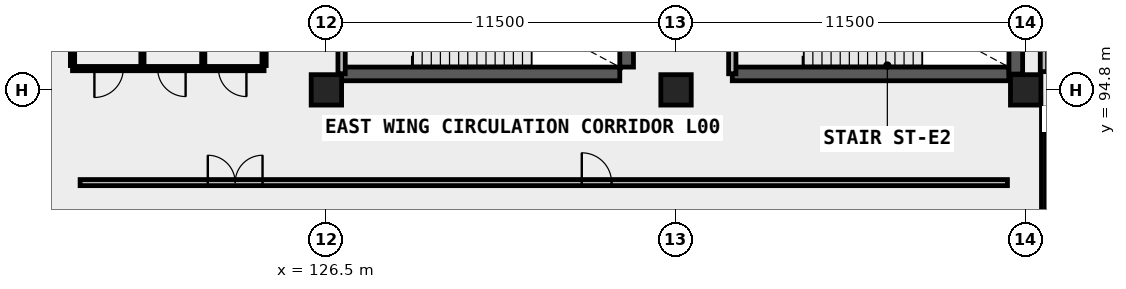
"""IFC4 building model, lengths in metres.
Left out: names, types, materials, properties, quantities, classifications, styles, units other than length and angle.
Written with IfcOpenShell. Run it as: python <this file> out.ifc"""

import sys

from ifc_helpers import new_model, si_unit, direction, frame, frame_2d, origin, origin_2d, place, context, subcontext, project, spatial, rectangle, extrude, element, fill, save


model = new_model("IFC4")
c1 = context("Model", 3, precision=1e-05, world=origin(), true_north=direction((0.0, 1.0)))
c2 = subcontext(c1, "Body", "Model", "MODEL_VIEW")
j1 = project(units=[si_unit("LENGTHUNIT", "METRE"), si_unit("PLANEANGLEUNIT", "RADIAN")], contexts=[c1])
p1 = place(None, origin())
s1 = spatial("IfcSite", under=j1, at=p1, CompositionType="ELEMENT")
p2 = place(p1, origin())
s2 = spatial("IfcBuilding", under=s1, at=p2, CompositionType="ELEMENT")
p3 = place(p2, origin())
s3 = spatial("IfcBuildingStorey", under=s2, at=p3, CompositionType="ELEMENT", Elevation=0.0)
for number, where, z_axis, x_axis in (
    (1, (126.5, 94.8, 0.0), (0.0, 0.0, 1.0), (1.0, 0.0, 0.0)),
    (2, (138.0, 94.8, 0.0), (0.0, 0.0, 1.0), (1.0, 0.0, 0.0)),
    (3, (149.5, 94.8, 0.0), (0.0, 0.0, 1.0), (1.0, 0.0, 0.0)),
):
    element("IfcColumn", number, at=place(p3, frame(where, z_axis=z_axis, x_axis=x_axis)), inside=s3, PredefinedType="COLUMN", context=c2, shape_type="SweptSolid", body=[
        extrude(rectangle(XDim=1.0, YDim=1.0, at=origin_2d()), origin(), (0.0, 0.0, 1.0), 4.2),
    ])
p4 = place(p3, frame((127.0, 95.325, 0.0), z_axis=(0.0, 0.0, 1.0), x_axis=(1.0, 0.0, 0.0)))
e4 = element("IfcWall", 4, at=p4, inside=s3, PredefinedType="SHEAR", context=c2, shape_type="SweptSolid", body=[
    extrude(rectangle(XDim=9.15, YDim=0.45, at=frame_2d((4.575, 0.0))), origin(), (0.0, 0.0, 1.0), 4.2),
])
p5 = place(p3, frame((136.375, 95.55, 0.0), z_axis=(0.0, 0.0, 1.0), x_axis=(0.0, 1.0, 0.0)))
e5 = element("IfcWall", 5, at=p5, inside=s3, PredefinedType="SHEAR", context=c2, shape_type="SweptSolid", body=[
    extrude(rectangle(XDim=3.6, YDim=0.45, at=frame_2d((1.8, 0.0))), origin(), (0.0, 0.0, 1.0), 4.2),
])
p6 = place(p3, frame((139.85, 95.325, 0.0), z_axis=(0.0, 0.0, 1.0), x_axis=(1.0, 0.0, 0.0)))
e6 = element("IfcWall", 6, at=p6, inside=s3, PredefinedType="SHEAR", context=c2, shape_type="SweptSolid", body=[
    extrude(rectangle(XDim=9.1, YDim=0.45, at=frame_2d((4.55, 0.0))), origin(), (0.0, 0.0, 1.0), 4.2),
])
p7 = place(p3, frame((149.175, 95.32, 0.0), z_axis=(0.0, 0.0, 1.0), x_axis=(0.0, 1.0, 0.0)))
e7 = element("IfcWall", 7, at=p7, inside=s3, PredefinedType="SHEAR", context=c2, shape_type="SweptSolid", body=[
    extrude(rectangle(XDim=3.83, YDim=0.45, at=frame_2d((1.915, 0.0))), origin(), (0.0, 0.0, 1.0), 4.2),
])
p8 = place(p3, frame((127.0, 95.33, 0.0), z_axis=(0.0, 0.0, 1.0), x_axis=(0.0, 1.0, 0.0)))
e8 = element("IfcWall", 8, at=p8, inside=s3, PredefinedType="SOLIDWALL", context=c2, shape_type="SweptSolid", body=[
    extrude(rectangle(XDim=4.04, YDim=0.24, at=frame_2d((2.02, 0.0))), origin(), (0.0, 0.0, 1.0), 3.88),
])
p9 = place(p8, frame((1.45, 0.0, 0.0)))
e9 = element("IfcOpeningElement", 9, at=p9, cuts=e8, PredefinedType="OPENING", context=c2, shape_type="SweptSolid", body=[
    extrude(rectangle(XDim=1.13, YDim=2.15, at=frame_2d((0.565, 1.075))), frame((0.0, 0.13, 0.0), z_axis=(0.0, -1.0, 0.0), x_axis=(1.0, 0.0, 0.0)), (0.0, 0.0, 1.0), 0.26),
])
p10 = place(p3, frame((139.85, 95.33, 0.0), z_axis=(0.0, 0.0, 1.0), x_axis=(0.0, 1.0, 0.0)))
e10 = element("IfcWall", 10, at=p10, inside=s3, PredefinedType="SOLIDWALL", context=c2, shape_type="SweptSolid", body=[
    extrude(rectangle(XDim=4.04, YDim=0.24, at=frame_2d((2.02, 0.0))), origin(), (0.0, 0.0, 1.0), 3.88),
])
p11 = place(p10, frame((1.45, 0.0, 0.0)))
e11 = element("IfcOpeningElement", 11, at=p11, cuts=e10, PredefinedType="OPENING", context=c2, shape_type="SweptSolid", body=[
    extrude(rectangle(XDim=1.13, YDim=2.15, at=frame_2d((0.565, 1.075))), frame((0.0, 0.13, 0.0), z_axis=(0.0, -1.0, 0.0), x_axis=(1.0, 0.0, 0.0)), (0.0, 0.0, 1.0), 0.26),
])
p12 = place(p3, frame((118.15, 95.5, 0.0), z_axis=(0.0, 0.0, 1.0), x_axis=(1.0, 0.0, 0.0)))
e12 = element("IfcWall", 12, at=p12, inside=s3, PredefinedType="PLUMBINGWALL", context=c2, shape_type="SweptSolid", body=[
    extrude(rectangle(XDim=6.3, YDim=0.14, at=frame_2d((3.15, 0.0))), origin(), (0.0, 0.0, 1.0), 3.88),
])
p13 = place(p12, frame((0.72, 0.0, 0.0)))
e13 = element("IfcOpeningElement", 13, at=p13, cuts=e12, PredefinedType="OPENING", context=c2, shape_type="SweptSolid", body=[
    extrude(rectangle(XDim=0.95, YDim=2.1, at=frame_2d((0.475, 1.05))), frame((0.0, 0.08, 0.0), z_axis=(0.0, -1.0, 0.0), x_axis=(1.0, 0.0, 0.0)), (0.0, 0.0, 1.0), 0.16),
])
p14 = place(p12, frame((2.8, 0.0, 0.0)))
e14 = element("IfcOpeningElement", 14, at=p14, cuts=e12, PredefinedType="OPENING", context=c2, shape_type="SweptSolid", body=[
    extrude(rectangle(XDim=0.92, YDim=2.1, at=frame_2d((0.46, 1.05))), frame((0.0, 0.08, 0.0), z_axis=(0.0, -1.0, 0.0), x_axis=(1.0, 0.0, 0.0)), (0.0, 0.0, 1.0), 0.16),
])
p15 = place(p12, frame((4.8, 0.0, 0.0)))
e15 = element("IfcOpeningElement", 15, at=p15, cuts=e12, PredefinedType="OPENING", context=c2, shape_type="SweptSolid", body=[
    extrude(rectangle(XDim=0.92, YDim=2.1, at=frame_2d((0.46, 1.05))), frame((0.0, 0.08, 0.0), z_axis=(0.0, -1.0, 0.0), x_axis=(1.0, 0.0, 0.0)), (0.0, 0.0, 1.0), 0.16),
])
p16 = place(p3, frame((118.15, 95.6, 0.0), z_axis=(0.0, 0.0, 1.0), x_axis=(0.0, 1.0, 0.0)))
e16 = element("IfcWall", 16, at=p16, inside=s3, PredefinedType="PLUMBINGWALL", context=c2, shape_type="SweptSolid", body=[
    extrude(rectangle(XDim=2.85, YDim=0.14, at=frame_2d((1.425, 0.0))), origin(), (0.0, 0.0, 1.0), 3.88),
])
for number, where, z_axis, x_axis in (
    (17, (120.45, 95.6, 0.0), (0.0, 0.0, 1.0), (0.0, 1.0, 0.0)),
    (18, (122.45, 95.6, 0.0), (0.0, 0.0, 1.0), (0.0, 1.0, 0.0)),
):
    element("IfcWall", number, at=place(p3, frame(where, z_axis=z_axis, x_axis=x_axis)), inside=s3, PredefinedType="PARTITIONING", context=c2, shape_type="SweptSolid", body=[
        extrude(rectangle(XDim=2.85, YDim=0.105, at=frame_2d((1.425, 0.0))), origin(), (0.0, 0.0, 1.0), 3.88),
    ])
p17 = place(p3, frame((124.45, 95.6, 0.0), z_axis=(0.0, 0.0, 1.0), x_axis=(0.0, 1.0, 0.0)))
e19 = element("IfcWall", 19, at=p17, inside=s3, PredefinedType="PLUMBINGWALL", context=c2, shape_type="SweptSolid", body=[
    extrude(rectangle(XDim=2.85, YDim=0.14, at=frame_2d((1.425, 0.0))), origin(), (0.0, 0.0, 1.0), 3.88),
])
p18 = place(p3, frame((118.4, 91.75, 0.0), z_axis=(0.0, 0.0, 1.0), x_axis=(1.0, 0.0, 0.0)))
e20 = element("IfcWall", 20, at=p18, inside=s3, PredefinedType="PARTITIONING", context=c2, shape_type="SweptSolid", body=[
    extrude(rectangle(XDim=30.5, YDim=0.2, at=frame_2d((15.25, 0.0))), origin(), (0.0, 0.0, 1.0), 3.88),
])
p19 = place(p18, frame((4.2, 0.0, 0.0)))
e21 = element("IfcOpeningElement", 21, at=p19, cuts=e20, PredefinedType="OPENING", context=c2, shape_type="SweptSolid", body=[
    extrude(rectangle(XDim=1.8, YDim=2.2, at=frame_2d((0.9, 1.1))), frame((0.0, 0.11, 0.0), z_axis=(0.0, -1.0, 0.0), x_axis=(1.0, 0.0, 0.0)), (0.0, 0.0, 1.0), 0.22),
])
p20 = place(p18, frame((16.5, 0.0, 0.0)))
e22 = element("IfcOpeningElement", 22, at=p20, cuts=e20, PredefinedType="OPENING", context=c2, shape_type="SweptSolid", body=[
    extrude(rectangle(XDim=0.98, YDim=2.15, at=frame_2d((0.49, 1.075))), frame((0.0, 0.11, 0.0), z_axis=(0.0, -1.0, 0.0), x_axis=(1.0, 0.0, 0.0)), (0.0, 0.0, 1.0), 0.22),
])
p21 = place(p3, frame((150.1, 86.4, 0.0), z_axis=(0.0, 0.0, 1.0), x_axis=(0.0, 1.0, 0.0)))
e23 = element("IfcWall", 23, at=p21, inside=s3, PredefinedType="PARTITIONING", context=c2, shape_type="SweptSolid", body=[
    extrude(rectangle(XDim=7.8, YDim=0.16, at=frame_2d((3.9, 0.0))), origin(), (0.0, 0.0, 1.0), 3.88),
])
p22 = place(p21, frame((2.8, 0.0, 0.0)))
e24 = element("IfcOpeningElement", 24, at=p22, cuts=e23, PredefinedType="OPENING", context=c2, shape_type="SweptSolid", body=[
    extrude(rectangle(XDim=0.96, YDim=2.1, at=frame_2d((0.48, 1.05))), frame((0.0, 0.09, 0.0), z_axis=(0.0, -1.0, 0.0), x_axis=(1.0, 0.0, 0.0)), (0.0, 0.0, 1.0), 0.18),
])
p23 = place(p3, frame((150.1, 95.4, 0.0), z_axis=(0.0, 0.0, 1.0), x_axis=(0.0, 1.0, 0.0)))
e25 = element("IfcWall", 25, at=p23, inside=s3, PredefinedType="SOLIDWALL", context=c2, shape_type="SweptSolid", body=[
    extrude(rectangle(XDim=3.8, YDim=0.24, at=frame_2d((1.9, 0.0))), origin(), (0.0, 0.0, 1.0), 3.88),
])
p24 = place(p13, frame((0.475, 0.0, 0.0), z_axis=(0.0, 0.0, 1.0), x_axis=(-1.0, 0.0, 0.0)))
e26 = element("IfcDoor", 26, at=p24, inside=s3, OperationType="SINGLE_SWING_LEFT", PredefinedType="DOOR", context=c2, shape_type="SweptSolid", body=[
    extrude(rectangle(XDim=0.95, YDim=2.1, at=frame_2d((0.0, 1.05))), frame((0.0, 0.025, 0.0), z_axis=(0.0, -1.0, 0.0), x_axis=(1.0, 0.0, 0.0)), (0.0, 0.0, 1.0), 0.05),
])
fill(e13, e26)
p25 = place(p14, origin())
e27 = element("IfcDoor", 27, at=p25, inside=s3, OperationType="SINGLE_SWING_RIGHT", PredefinedType="DOOR", context=c2, shape_type="SweptSolid", body=[
    extrude(rectangle(XDim=0.92, YDim=2.1, at=frame_2d((0.46, 1.05))), frame((0.0, 0.025, 0.0), z_axis=(0.0, -1.0, 0.0), x_axis=(1.0, 0.0, 0.0)), (0.0, 0.0, 1.0), 0.05),
])
fill(e14, e27)
p26 = place(p15, origin())
e28 = element("IfcDoor", 28, at=p26, inside=s3, OperationType="SINGLE_SWING_RIGHT", PredefinedType="DOOR", context=c2, shape_type="SweptSolid", body=[
    extrude(rectangle(XDim=0.92, YDim=2.1, at=frame_2d((0.46, 1.05))), frame((0.0, 0.025, 0.0), z_axis=(0.0, -1.0, 0.0), x_axis=(1.0, 0.0, 0.0)), (0.0, 0.0, 1.0), 0.05),
])
fill(e15, e28)
p27 = place(p19, origin())
e29 = element("IfcDoor", 29, at=p27, inside=s3, OperationType="DOUBLE_DOOR_SINGLE_SWING", PredefinedType="DOOR", context=c2, shape_type="SweptSolid", body=[
    extrude(rectangle(XDim=1.8, YDim=2.2, at=frame_2d((0.9, 1.1))), frame((0.0, 0.025, 0.0), z_axis=(0.0, -1.0, 0.0), x_axis=(1.0, 0.0, 0.0)), (0.0, 0.0, 1.0), 0.05),
])
fill(e21, e29)
p28 = place(p20, origin())
e30 = element("IfcDoor", 30, at=p28, inside=s3, OperationType="SINGLE_SWING_LEFT", PredefinedType="DOOR", context=c2, shape_type="SweptSolid", body=[
    extrude(rectangle(XDim=0.98, YDim=2.15, at=frame_2d((0.49, 1.075))), frame((0.0, 0.025, 0.0), z_axis=(0.0, -1.0, 0.0), x_axis=(1.0, 0.0, 0.0)), (0.0, 0.0, 1.0), 0.05),
])
fill(e22, e30)
save(model, sys.argv[1])
